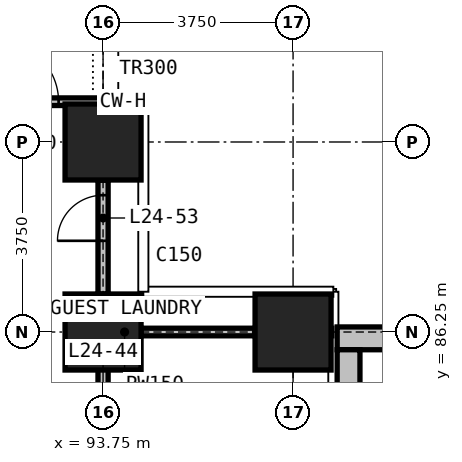
"""IFC4 building model, lengths in metres.
Left out: names, types, materials, properties, quantities, classifications, styles, units other than length and angle.
Written with IfcOpenShell. Run it as: python <this file> out.ifc"""

import sys

from ifc_helpers import new_model, si_unit, direction, frame, frame_2d, origin, origin_2d, place, context, subcontext, project, spatial, rectangle, extrude, element, fill, save


model = new_model("IFC4")
c1 = context("Model", 3, precision=1e-05, world=origin(), true_north=direction((0.0, 1.0)))
c2 = subcontext(c1, "Body", "Model", "MODEL_VIEW")
j1 = project(units=[si_unit("LENGTHUNIT", "METRE"), si_unit("PLANEANGLEUNIT", "RADIAN")], contexts=[c1])
p1 = place(None, origin())
s1 = spatial("IfcSite", under=j1, at=p1, CompositionType="ELEMENT")
p2 = place(p1, origin())
s2 = spatial("IfcBuilding", under=s1, at=p2, CompositionType="ELEMENT")
p3 = place(p2, frame((0.0, 0.0, 98.9)))
s3 = spatial("IfcBuildingStorey", under=s2, at=p3, CompositionType="ELEMENT", Elevation=98.9)
for number, where, z_axis, x_axis in (
    (1, (93.75, 86.25, 0.0), (0.0, 0.0, 1.0), (1.0, 0.0, 0.0)),
    (2, (93.75, 90.0, 0.0), (0.0, 0.0, 1.0), (1.0, 0.0, 0.0)),
    (3, (97.5, 86.25, 0.0), (0.0, 0.0, 1.0), (1.0, 0.0, 0.0)),
):
    element("IfcColumn", number, at=place(p3, frame(where, z_axis=z_axis, x_axis=x_axis)), inside=s3, PredefinedType="COLUMN", context=c2, shape_type="SweptSolid", body=[
        extrude(rectangle(XDim=1.5, YDim=1.5, at=origin_2d()), origin(), (0.0, 0.0, 1.0), 3.3),
    ])
p4 = place(p3, frame((90.795, 90.795, 0.0), z_axis=(0.0, 0.0, 1.0), x_axis=(1.0, 0.0, 0.0)))
e4 = element("IfcWall", 4, at=p4, inside=s3, PredefinedType="SOLIDWALL", context=c2, shape_type="SweptSolid", body=[
    extrude(rectangle(XDim=2.955, YDim=0.15, at=frame_2d((1.478, 0.0))), origin(), (0.0, 0.0, 1.0), 2.95),
])
p5 = place(p4, frame((0.877, 0.0, 0.0)))
e5 = element("IfcOpeningElement", 5, at=p5, cuts=e4, PredefinedType="OPENING", context=c2, shape_type="SweptSolid", body=[
    extrude(rectangle(XDim=1.2, YDim=2.4, at=frame_2d((0.6, 1.2))), frame((0.0, 0.085, 0.0), z_axis=(0.0, -1.0, 0.0), x_axis=(1.0, 0.0, 0.0)), (0.0, 0.0, 1.0), 0.17),
])
p6 = place(p3, frame((98.37, 86.125, 0.0), z_axis=(0.0, 0.0, 1.0), x_axis=(1.0, 0.0, 0.0)))
e6 = element("IfcWall", 6, at=p6, inside=s3, PredefinedType="USERDEFINED", context=c2, shape_type="SweptSolid", body=[
    extrude(rectangle(XDim=3.18, YDim=0.45, at=frame_2d((1.59, 0.0))), origin(), (0.0, 0.0, 1.0), 1.1),
])
p7 = place(p3, frame((98.595, 84.9, 0.0), z_axis=(0.0, 0.0, 1.0), x_axis=(0.0, 1.0, 0.0)))
e7 = element("IfcWall", 7, at=p7, inside=s3, PredefinedType="USERDEFINED", context=c2, shape_type="SweptSolid", body=[
    extrude(rectangle(XDim=1.0, YDim=0.45, at=frame_2d((0.5, 0.0))), origin(), (0.0, 0.0, 1.0), 1.1),
])
p8 = place(p3, frame((93.75, 52.4, 0.0), z_axis=(0.0, 0.0, 1.0), x_axis=(0.0, 1.0, 0.0)))
e8 = element("IfcWall", 8, at=p8, inside=s3, PredefinedType="PARTITIONING", context=c2, shape_type="SweptSolid", body=[
    extrude(rectangle(XDim=34.6, YDim=0.2, at=frame_2d((17.3, 0.0))), origin(), (0.0, 0.0, 1.0), 2.95),
])
p9 = place(p8, frame((2.35, 0.0, 0.0)))
e9 = element("IfcOpeningElement", 9, at=p9, cuts=e8, PredefinedType="OPENING", context=c2, shape_type="SweptSolid", body=[
    extrude(rectangle(XDim=1.0, YDim=2.1, at=frame_2d((0.5, 1.05))), frame((0.0, 0.11, 0.0), z_axis=(0.0, -1.0, 0.0), x_axis=(1.0, 0.0, 0.0)), (0.0, 0.0, 1.0), 0.22),
])
p10 = place(p8, frame((4.95, 0.0, 0.0)))
e10 = element("IfcOpeningElement", 10, at=p10, cuts=e8, PredefinedType="OPENING", context=c2, shape_type="SweptSolid", body=[
    extrude(rectangle(XDim=1.0, YDim=2.2, at=frame_2d((0.5, 1.1))), frame((0.0, 0.11, 0.0), z_axis=(0.0, -1.0, 0.0), x_axis=(1.0, 0.0, 0.0)), (0.0, 0.0, 1.0), 0.22),
])
p11 = place(p8, frame((16.75, 0.0, 0.0)))
e11 = element("IfcOpeningElement", 11, at=p11, cuts=e8, PredefinedType="OPENING", context=c2, shape_type="SweptSolid", body=[
    extrude(rectangle(XDim=1.0, YDim=2.2, at=frame_2d((0.5, 1.1))), frame((0.0, 0.11, 0.0), z_axis=(0.0, -1.0, 0.0), x_axis=(1.0, 0.0, 0.0)), (0.0, 0.0, 1.0), 0.22),
])
p12 = place(p8, frame((19.95, 0.0, 0.0)))
e12 = element("IfcOpeningElement", 12, at=p12, cuts=e8, PredefinedType="OPENING", context=c2, shape_type="SweptSolid", body=[
    extrude(rectangle(XDim=1.0, YDim=2.2, at=frame_2d((0.5, 1.1))), frame((0.0, 0.11, 0.0), z_axis=(0.0, -1.0, 0.0), x_axis=(1.0, 0.0, 0.0)), (0.0, 0.0, 1.0), 0.22),
])
p13 = place(p8, frame((31.75, 0.0, 0.0)))
e13 = element("IfcOpeningElement", 13, at=p13, cuts=e8, PredefinedType="OPENING", context=c2, shape_type="SweptSolid", body=[
    extrude(rectangle(XDim=1.0, YDim=2.2, at=frame_2d((0.5, 1.1))), frame((0.0, 0.11, 0.0), z_axis=(0.0, -1.0, 0.0), x_axis=(1.0, 0.0, 0.0)), (0.0, 0.0, 1.0), 0.22),
])
p14 = place(p3, frame((93.75, 87.0, 0.0), z_axis=(0.0, 0.0, 1.0), x_axis=(0.0, 1.0, 0.0)))
e14 = element("IfcWall", 14, at=p14, inside=s3, PredefinedType="PARTITIONING", context=c2, shape_type="SweptSolid", body=[
    extrude(rectangle(XDim=2.25, YDim=0.2, at=frame_2d((1.125, 0.0))), origin(), (0.0, 0.0, 1.0), 2.15),
])
p15 = place(p14, frame((1.05, 0.0, 0.0)))
e15 = element("IfcOpeningElement", 15, at=p15, cuts=e14, PredefinedType="OPENING", context=c2, shape_type="SweptSolid", body=[
    extrude(rectangle(XDim=0.9, YDim=2.1, at=frame_2d((0.45, 1.05))), frame((0.0, 0.11, 0.0), z_axis=(0.0, -1.0, 0.0), x_axis=(1.0, 0.0, 0.0)), (0.0, 0.0, 1.0), 0.22),
])
p16 = place(p3, frame((93.75, 89.25, 0.0), z_axis=(0.0, 0.0, 1.0), x_axis=(0.0, 1.0, 0.0)))
e16 = element("IfcWall", 16, at=p16, inside=s3, PredefinedType="PARTITIONING", context=c2, shape_type="SweptSolid", body=[
    extrude(rectangle(XDim=1.46, YDim=0.2, at=frame_2d((0.73, 0.0))), origin(), (0.0, 0.0, 1.0), 2.95),
])
p17 = place(p3, frame((93.85, 86.25, 0.0), z_axis=(0.0, 0.0, 1.0), x_axis=(1.0, 0.0, 0.0)))
e17 = element("IfcWall", 17, at=p17, inside=s3, PredefinedType="PARTITIONING", context=c2, shape_type="SweptSolid", body=[
    extrude(rectangle(XDim=0.65, YDim=0.15, at=frame_2d((0.325, 0.0))), origin(), (0.0, 0.0, 1.0), 2.95),
])
p18 = place(p3, frame((94.5, 86.25, 0.0), z_axis=(0.0, 0.0, 1.0), x_axis=(1.0, 0.0, 0.0)))
e18 = element("IfcWall", 18, at=p18, inside=s3, PredefinedType="PARTITIONING", context=c2, shape_type="SweptSolid", body=[
    extrude(rectangle(XDim=2.251, YDim=0.15, at=frame_2d((1.125, 0.0))), origin(), (0.0, 0.0, 1.0), 2.15),
])
p19 = place(p3, frame((96.751, 86.25, 0.0), z_axis=(0.0, 0.0, 1.0), x_axis=(1.0, 0.0, 0.0)))
e19 = element("IfcWall", 19, at=p19, inside=s3, PredefinedType="PARTITIONING", context=c2, shape_type="SweptSolid", body=[
    extrude(rectangle(XDim=1.514, YDim=0.15, at=frame_2d((0.757, 0.0))), origin(), (0.0, 0.0, 1.0), 2.95),
])
p20 = place(p5, origin())
e20 = element("IfcDoor", 20, at=p20, inside=s3, OperationType="SINGLE_SWING_LEFT", PredefinedType="DOOR", context=c2, shape_type="SweptSolid", body=[
    extrude(rectangle(XDim=1.2, YDim=2.4, at=frame_2d((0.6, 1.2))), frame((0.0, 0.025, 0.0), z_axis=(0.0, -1.0, 0.0), x_axis=(1.0, 0.0, 0.0)), (0.0, 0.0, 1.0), 0.05),
])
fill(e5, e20)
p21 = place(p15, origin())
e21 = element("IfcDoor", 21, at=p21, inside=s3, OperationType="SINGLE_SWING_RIGHT", PredefinedType="DOOR", context=c2, shape_type="SweptSolid", body=[
    extrude(rectangle(XDim=0.9, YDim=2.1, at=frame_2d((0.45, 1.05))), frame((0.0, 0.025, 0.0), z_axis=(0.0, -1.0, 0.0), x_axis=(1.0, 0.0, 0.0)), (0.0, 0.0, 1.0), 0.05),
])
fill(e15, e21)
save(model, sys.argv[1])
